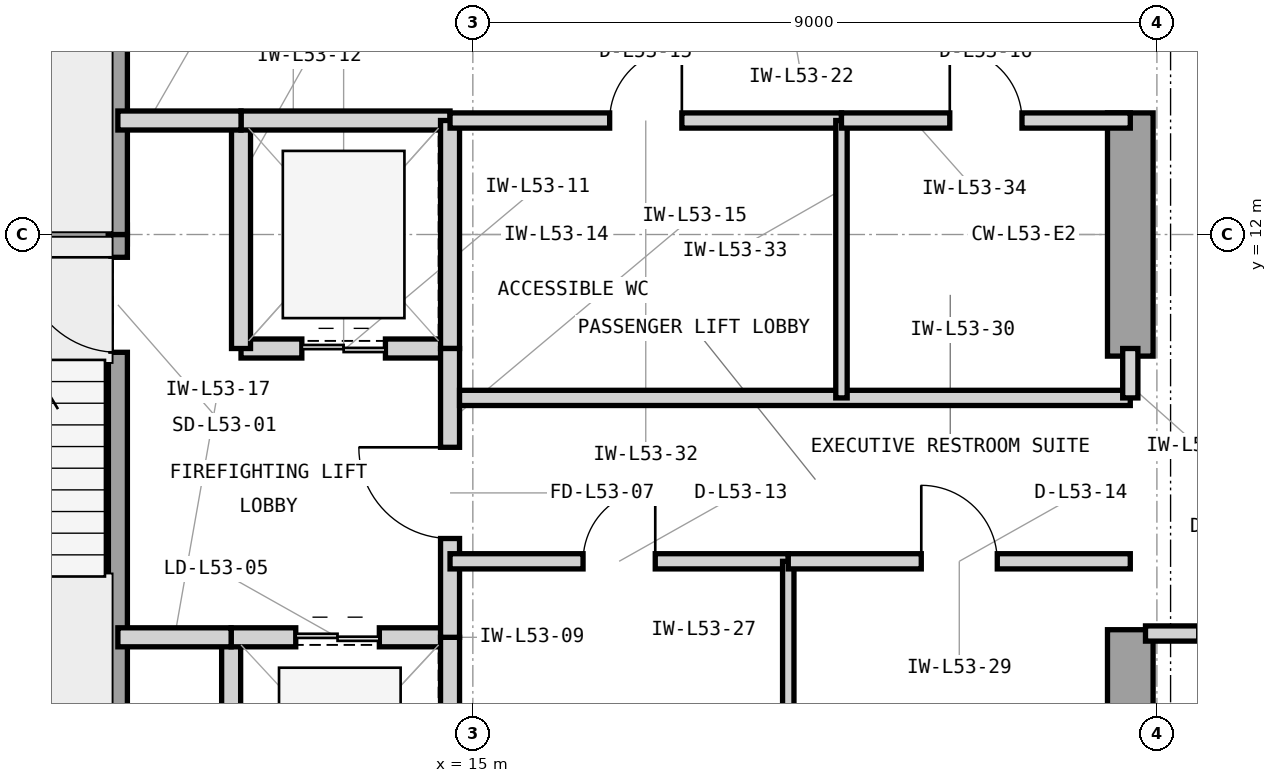
"""IFC4 building model, lengths in metres.
Left out: names, types, materials, properties, quantities, classifications, styles, units other than length and angle.
Written with IfcOpenShell. Run it as: python <this file> out.ifc"""

import sys

from ifc_helpers import new_model, si_unit, direction, frame, frame_2d, origin, place, context, subcontext, project, spatial, rectangle, extrude, element, fill, save


model = new_model("IFC4")
c1 = context("Model", 3, precision=1e-05, world=origin(), true_north=direction((0.0, 1.0)))
c2 = subcontext(c1, "Body", "Model", "MODEL_VIEW")
j1 = project(units=[si_unit("LENGTHUNIT", "METRE"), si_unit("PLANEANGLEUNIT", "RADIAN")], contexts=[c1])
p1 = place(None, origin())
s1 = spatial("IfcSite", under=j1, at=p1, CompositionType="ELEMENT")
p2 = place(p1, origin())
s2 = spatial("IfcBuilding", under=s1, at=p2, CompositionType="ELEMENT")
p3 = place(p2, frame((0.0, 0.0, 219.0)))
s3 = spatial("IfcBuildingStorey", under=s2, at=p3, CompositionType="ELEMENT", Elevation=219.0)
p4 = place(p3, frame((23.65, 3.65, 0.0), z_axis=(0.0, 0.0, 1.0), x_axis=(0.0, 1.0, 0.0)))
e1 = element("IfcWall", 1, at=p4, inside=s3, PredefinedType="SHEAR", context=c2, shape_type="SweptSolid", body=[
    extrude(rectangle(XDim=3.15, YDim=0.6, at=frame_2d((1.575, 0.0))), origin(), (0.0, 0.0, 1.0), 3.9),
])
p5 = place(p3, frame((23.65, 10.4, 0.0), z_axis=(0.0, 0.0, 1.0), x_axis=(0.0, 1.0, 0.0)))
e2 = element("IfcWall", 2, at=p5, inside=s3, PredefinedType="SHEAR", context=c2, shape_type="SweptSolid", body=[
    extrude(rectangle(XDim=3.2, YDim=0.6, at=frame_2d((1.6, 0.0))), origin(), (0.0, 0.0, 1.0), 3.9),
])
p6 = place(p3, frame((6.35, 12.0, 0.0), z_axis=(0.0, 0.0, 1.0), x_axis=(1.0, 0.0, 0.0)))
e3 = element("IfcWall", 3, at=p6, inside=s3, PredefinedType="SHEAR", context=c2, shape_type="SweptSolid", body=[
    extrude(rectangle(XDim=4.105, YDim=0.25, at=frame_2d((2.052, 0.0))), origin(), (0.0, 0.0, 1.0), 3.9),
])
p7 = place(p3, frame((10.33, 4.55, 0.0), z_axis=(0.0, 0.0, 1.0), x_axis=(0.0, 1.0, 0.0)))
e4 = element("IfcWall", 4, at=p7, inside=s3, PredefinedType="SHEAR", context=c2, shape_type="SweptSolid", body=[
    extrude(rectangle(XDim=7.45, YDim=0.25, at=frame_2d((3.725, 0.0))), origin(), (0.0, 0.0, 1.0), 3.9),
])
p8 = place(p7, frame((5.9, 0.0, 0.0)))
e5 = element("IfcOpeningElement", 5, at=p8, cuts=e4, PredefinedType="OPENING", context=c2, shape_type="SweptSolid", body=[
    extrude(rectangle(XDim=1.25, YDim=2.2, at=frame_2d((0.625, 1.1))), frame((0.0, 0.135, 0.0), z_axis=(0.0, -1.0, 0.0), x_axis=(1.0, 0.0, 0.0)), (0.0, 0.0, 1.0), 0.27),
])
p9 = place(p3, frame((10.33, 12.0, 0.0), z_axis=(0.0, 0.0, 1.0), x_axis=(0.0, 1.0, 0.0)))
e6 = element("IfcWall", 6, at=p9, inside=s3, PredefinedType="SHEAR", context=c2, shape_type="SweptSolid", body=[
    extrude(rectangle(XDim=7.45, YDim=0.25, at=frame_2d((3.725, 0.0))), origin(), (0.0, 0.0, 1.0), 3.9),
])
p10 = place(p9, frame((5.85, 0.0, 0.0)))
e7 = element("IfcOpeningElement", 7, at=p10, cuts=e6, PredefinedType="OPENING", context=c2, shape_type="SweptSolid", body=[
    extrude(rectangle(XDim=1.25, YDim=2.2, at=frame_2d((0.625, 1.1))), frame((0.0, 0.135, 0.0), z_axis=(0.0, -1.0, 0.0), x_axis=(1.0, 0.0, 0.0)), (0.0, 0.0, 1.0), 0.27),
])
p11 = place(p3, frame((11.82, 3.35, 0.0), z_axis=(0.0, 0.0, 1.0), x_axis=(0.0, 1.0, 0.0)))
e8 = element("IfcWall", 8, at=p11, inside=s3, PredefinedType="PARTITIONING", context=c2, shape_type="SweptSolid", body=[
    extrude(rectangle(XDim=3.35, YDim=0.25, at=frame_2d((1.675, 0.0))), origin(), (0.0, 0.0, 1.0), 3.64),
])
p12 = place(p3, frame((11.82, 6.7, 0.0), z_axis=(0.0, 0.0, 1.0), x_axis=(1.0, 0.0, 0.0)))
e9 = element("IfcWall", 9, at=p12, inside=s3, PredefinedType="PARTITIONING", context=c2, shape_type="SweptSolid", body=[
    extrude(rectangle(XDim=2.88, YDim=0.25, at=frame_2d((1.44, 0.0))), origin(), (0.0, 0.0, 1.0), 3.283),
])
p13 = place(p12, frame((0.85, 0.0, 0.0)))
e10 = element("IfcOpeningElement", 10, at=p13, cuts=e9, PredefinedType="OPENING", context=c2, shape_type="SweptSolid", body=[
    extrude(rectangle(XDim=1.1, YDim=2.25, at=frame_2d((0.55, 1.125))), frame((0.0, 0.135, 0.0), z_axis=(0.0, -1.0, 0.0), x_axis=(1.0, 0.0, 0.0)), (0.0, 0.0, 1.0), 0.27),
])
p14 = place(p3, frame((14.7, 3.35, 0.0), z_axis=(0.0, 0.0, 1.0), x_axis=(0.0, 1.0, 0.0)))
e11 = element("IfcWall", 11, at=p14, inside=s3, PredefinedType="PARTITIONING", context=c2, shape_type="SweptSolid", body=[
    extrude(rectangle(XDim=3.35, YDim=0.25, at=frame_2d((1.675, 0.0))), origin(), (0.0, 0.0, 1.0), 3.64),
])
p15 = place(p3, frame((11.95, 10.5, 0.0), z_axis=(0.0, 0.0, 1.0), x_axis=(1.0, 0.0, 0.0)))
e12 = element("IfcWall", 12, at=p15, inside=s3, PredefinedType="PARTITIONING", context=c2, shape_type="SweptSolid", body=[
    extrude(rectangle(XDim=2.75, YDim=0.25, at=frame_2d((1.375, 0.0))), origin(), (0.0, 0.0, 1.0), 3.283),
])
p16 = place(p15, frame((0.8, 0.0, 0.0)))
e13 = element("IfcOpeningElement", 13, at=p16, cuts=e12, PredefinedType="OPENING", context=c2, shape_type="SweptSolid", body=[
    extrude(rectangle(XDim=1.1, YDim=2.25, at=frame_2d((0.55, 1.125))), frame((0.0, 0.135, 0.0), z_axis=(0.0, -1.0, 0.0), x_axis=(1.0, 0.0, 0.0)), (0.0, 0.0, 1.0), 0.27),
])
p17 = place(p3, frame((11.95, 10.5, 0.0), z_axis=(0.0, 0.0, 1.0), x_axis=(0.0, 1.0, 0.0)))
e14 = element("IfcWall", 14, at=p17, inside=s3, PredefinedType="PARTITIONING", context=c2, shape_type="SweptSolid", body=[
    extrude(rectangle(XDim=3.0, YDim=0.25, at=frame_2d((1.5, 0.0))), origin(), (0.0, 0.0, 1.0), 3.64),
])
p18 = place(p3, frame((11.95, 13.5, 0.0), z_axis=(0.0, 0.0, 1.0), x_axis=(1.0, 0.0, 0.0)))
e15 = element("IfcWall", 15, at=p18, inside=s3, PredefinedType="PARTITIONING", context=c2, shape_type="SweptSolid", body=[
    extrude(rectangle(XDim=2.75, YDim=0.25, at=frame_2d((1.375, 0.0))), origin(), (0.0, 0.0, 1.0), 3.283),
])
p19 = place(p3, frame((14.7, 10.5, 0.0), z_axis=(0.0, 0.0, 1.0), x_axis=(0.0, 1.0, 0.0)))
e16 = element("IfcWall", 16, at=p19, inside=s3, PredefinedType="PARTITIONING", context=c2, shape_type="SweptSolid", body=[
    extrude(rectangle(XDim=3.0, YDim=0.25, at=frame_2d((1.5, 0.0))), origin(), (0.0, 0.0, 1.0), 3.64),
])
p20 = place(p3, frame((14.7, 6.7, 0.0), z_axis=(0.0, 0.0, 1.0), x_axis=(0.0, 1.0, 0.0)))
e17 = element("IfcWall", 17, at=p20, inside=s3, PredefinedType="PARTITIONING", context=c2, shape_type="SweptSolid", body=[
    extrude(rectangle(XDim=3.8, YDim=0.25, at=frame_2d((1.9, 0.0))), origin(), (0.0, 0.0, 1.0), 3.64),
])
p21 = place(p20, frame((1.3, 0.0, 0.0)))
e18 = element("IfcOpeningElement", 18, at=p21, cuts=e17, PredefinedType="OPENING", context=c2, shape_type="SweptSolid", body=[
    extrude(rectangle(XDim=1.2, YDim=2.2, at=frame_2d((0.6, 1.1))), frame((0.0, 0.135, 0.0), z_axis=(0.0, -1.0, 0.0), x_axis=(1.0, 0.0, 0.0)), (0.0, 0.0, 1.0), 0.27),
])
p22 = place(p3, frame((10.33, 13.5, 0.0), z_axis=(0.0, 0.0, 1.0), x_axis=(1.0, 0.0, 0.0)))
e19 = element("IfcWall", 19, at=p22, inside=s3, PredefinedType="PARTITIONING", context=c2, shape_type="SweptSolid", body=[
    extrude(rectangle(XDim=1.62, YDim=0.25, at=frame_2d((0.81, 0.0))), origin(), (0.0, 0.0, 1.0), 3.283),
])
p23 = place(p3, frame((10.33, 6.7, 0.0), z_axis=(0.0, 0.0, 1.0), x_axis=(1.0, 0.0, 0.0)))
e20 = element("IfcWall", 20, at=p23, inside=s3, PredefinedType="PARTITIONING", context=c2, shape_type="SweptSolid", body=[
    extrude(rectangle(XDim=1.49, YDim=0.25, at=frame_2d((0.745, 0.0))), origin(), (0.0, 0.0, 1.0), 3.283),
])
p24 = place(p3, frame((14.7, 7.7, 0.0), z_axis=(0.0, 0.0, 1.0), x_axis=(1.0, 0.0, 0.0)))
e21 = element("IfcWall", 21, at=p24, inside=s3, PredefinedType="PARTITIONING", context=c2, shape_type="SweptSolid", body=[
    extrude(rectangle(XDim=4.45, YDim=0.2, at=frame_2d((2.225, 0.0))), origin(), (0.0, 0.0, 1.0), 3.64),
])
p25 = place(p24, frame((1.75, 0.0, 0.0)))
e22 = element("IfcOpeningElement", 22, at=p25, cuts=e21, PredefinedType="OPENING", context=c2, shape_type="SweptSolid", body=[
    extrude(rectangle(XDim=0.95, YDim=2.1, at=frame_2d((0.475, 1.05))), frame((0.0, 0.11, 0.0), z_axis=(0.0, -1.0, 0.0), x_axis=(1.0, 0.0, 0.0)), (0.0, 0.0, 1.0), 0.22),
])
p26 = place(p3, frame((19.15, 3.35, 0.0), z_axis=(0.0, 0.0, 1.0), x_axis=(0.0, 1.0, 0.0)))
e23 = element("IfcWall", 23, at=p26, inside=s3, PredefinedType="PARTITIONING", context=c2, shape_type="SweptSolid", body=[
    extrude(rectangle(XDim=4.35, YDim=0.15, at=frame_2d((2.175, 0.0))), origin(), (0.0, 0.0, 1.0), 3.64),
])
p27 = place(p3, frame((19.15, 7.7, 0.0), z_axis=(0.0, 0.0, 1.0), x_axis=(1.0, 0.0, 0.0)))
e24 = element("IfcWall", 24, at=p27, inside=s3, PredefinedType="PARTITIONING", context=c2, shape_type="SweptSolid", body=[
    extrude(rectangle(XDim=4.5, YDim=0.2, at=frame_2d((2.25, 0.0))), origin(), (0.0, 0.0, 1.0), 3.64),
])
p28 = place(p27, frame((1.75, 0.0, 0.0)))
e25 = element("IfcOpeningElement", 25, at=p28, cuts=e24, PredefinedType="OPENING", context=c2, shape_type="SweptSolid", body=[
    extrude(rectangle(XDim=1.0, YDim=2.15, at=frame_2d((0.5, 1.075))), frame((0.0, 0.11, 0.0), z_axis=(0.0, -1.0, 0.0), x_axis=(1.0, 0.0, 0.0)), (0.0, 0.0, 1.0), 0.22),
])
p29 = place(p3, frame((14.825, 9.85, 0.0), z_axis=(0.0, 0.0, 1.0), x_axis=(1.0, 0.0, 0.0)))
e26 = element("IfcWall", 26, at=p29, inside=s3, PredefinedType="PARTITIONING", context=c2, shape_type="SweptSolid", body=[
    extrude(rectangle(XDim=8.825, YDim=0.2, at=frame_2d((4.413, 0.0))), origin(), (0.0, 0.0, 1.0), 3.64),
])
p30 = place(p3, frame((23.65, 9.85, 0.0), z_axis=(0.0, 0.0, 1.0), x_axis=(0.0, 1.0, 0.0)))
e27 = element("IfcWall", 27, at=p30, inside=s3, PredefinedType="PARTITIONING", context=c2, shape_type="SweptSolid", body=[
    extrude(rectangle(XDim=0.65, YDim=0.2, at=frame_2d((0.325, 0.0))), origin(), (0.0, 0.0, 1.0), 3.64),
])
p31 = place(p3, frame((14.7, 13.5, 0.0), z_axis=(0.0, 0.0, 1.0), x_axis=(1.0, 0.0, 0.0)))
e28 = element("IfcWall", 28, at=p31, inside=s3, PredefinedType="PARTITIONING", context=c2, shape_type="SweptSolid", body=[
    extrude(rectangle(XDim=5.15, YDim=0.2, at=frame_2d((2.575, 0.0))), origin(), (0.0, 0.0, 1.0), 3.283),
])
p32 = place(p31, frame((2.1, 0.0, 0.0)))
e29 = element("IfcOpeningElement", 29, at=p32, cuts=e28, PredefinedType="OPENING", context=c2, shape_type="SweptSolid", body=[
    extrude(rectangle(XDim=0.95, YDim=2.1, at=frame_2d((0.475, 1.05))), frame((0.0, 0.11, 0.0), z_axis=(0.0, -1.0, 0.0), x_axis=(1.0, 0.0, 0.0)), (0.0, 0.0, 1.0), 0.22),
])
p33 = place(p3, frame((19.85, 9.85, 0.0), z_axis=(0.0, 0.0, 1.0), x_axis=(0.0, 1.0, 0.0)))
e30 = element("IfcWall", 30, at=p33, inside=s3, PredefinedType="PARTITIONING", context=c2, shape_type="SweptSolid", body=[
    extrude(rectangle(XDim=3.65, YDim=0.15, at=frame_2d((1.825, 0.0))), origin(), (0.0, 0.0, 1.0), 3.64),
])
p34 = place(p3, frame((19.85, 13.5, 0.0), z_axis=(0.0, 0.0, 1.0), x_axis=(1.0, 0.0, 0.0)))
e31 = element("IfcWall", 31, at=p34, inside=s3, PredefinedType="PARTITIONING", context=c2, shape_type="SweptSolid", body=[
    extrude(rectangle(XDim=3.8, YDim=0.2, at=frame_2d((1.9, 0.0))), origin(), (0.0, 0.0, 1.0), 3.283),
])
p35 = place(p34, frame((1.425, 0.0, 0.0)))
e32 = element("IfcOpeningElement", 32, at=p35, cuts=e31, PredefinedType="OPENING", context=c2, shape_type="SweptSolid", body=[
    extrude(rectangle(XDim=0.95, YDim=2.1, at=frame_2d((0.475, 1.05))), frame((0.0, 0.11, 0.0), z_axis=(0.0, -1.0, 0.0), x_axis=(1.0, 0.0, 0.0)), (0.0, 0.0, 1.0), 0.22),
])
p36 = place(p3, frame((23.85, 6.75, 0.0), z_axis=(0.0, 0.0, 1.0), x_axis=(1.0, 0.0, 0.0)))
e33 = element("IfcWall", 33, at=p36, inside=s3, PredefinedType="PARTITIONING", context=c2, shape_type="SweptSolid", body=[
    extrude(rectangle(XDim=2.85, YDim=0.2, at=frame_2d((1.425, 0.0))), origin(), (0.0, 0.0, 1.0), 3.64),
])
p37 = place(p36, frame((0.7, 0.0, 0.0)))
e34 = element("IfcOpeningElement", 34, at=p37, cuts=e33, PredefinedType="OPENING", context=c2, shape_type="SweptSolid", body=[
    extrude(rectangle(XDim=1.0, YDim=2.15, at=frame_2d((0.5, 1.075))), frame((0.0, 0.11, 0.0), z_axis=(0.0, -1.0, 0.0), x_axis=(1.0, 0.0, 0.0)), (0.0, 0.0, 1.0), 0.22),
])
p38 = place(p8, origin())
e35 = element("IfcDoor", 35, at=p38, inside=s3, OperationType="SINGLE_SWING_RIGHT", PredefinedType="DOOR", context=c2, shape_type="SweptSolid", body=[
    extrude(rectangle(XDim=1.25, YDim=2.2, at=frame_2d((0.625, 1.1))), frame((0.0, 0.025, 0.0), z_axis=(0.0, -1.0, 0.0), x_axis=(1.0, 0.0, 0.0)), (0.0, 0.0, 1.0), 0.05),
])
fill(e5, e35)
p39 = place(p13, origin())
e36 = element("IfcDoor", 36, at=p39, inside=s3, OperationType="DOUBLE_DOOR_SLIDING", PredefinedType="DOOR", context=c2, shape_type="SweptSolid", body=[
    extrude(rectangle(XDim=1.1, YDim=2.25, at=frame_2d((0.55, 1.125))), frame((0.0, 0.025, 0.0), z_axis=(0.0, -1.0, 0.0), x_axis=(1.0, 0.0, 0.0)), (0.0, 0.0, 1.0), 0.05),
])
fill(e10, e36)
p40 = place(p16, origin())
e37 = element("IfcDoor", 37, at=p40, inside=s3, OperationType="DOUBLE_DOOR_SLIDING", PredefinedType="DOOR", context=c2, shape_type="SweptSolid", body=[
    extrude(rectangle(XDim=1.1, YDim=2.25, at=frame_2d((0.55, 1.125))), frame((0.0, 0.025, 0.0), z_axis=(0.0, -1.0, 0.0), x_axis=(1.0, 0.0, 0.0)), (0.0, 0.0, 1.0), 0.05),
])
fill(e13, e37)
p41 = place(p21, origin())
e38 = element("IfcDoor", 38, at=p41, inside=s3, OperationType="SINGLE_SWING_RIGHT", PredefinedType="DOOR", context=c2, shape_type="SweptSolid", body=[
    extrude(rectangle(XDim=1.2, YDim=2.2, at=frame_2d((0.6, 1.1))), frame((0.0, 0.025, 0.0), z_axis=(0.0, -1.0, 0.0), x_axis=(1.0, 0.0, 0.0)), (0.0, 0.0, 1.0), 0.05),
])
fill(e18, e38)
p42 = place(p25, origin())
e39 = element("IfcDoor", 39, at=p42, inside=s3, OperationType="SINGLE_SWING_RIGHT", PredefinedType="DOOR", context=c2, shape_type="SweptSolid", body=[
    extrude(rectangle(XDim=0.95, YDim=2.1, at=frame_2d((0.475, 1.05))), frame((0.0, 0.025, 0.0), z_axis=(0.0, -1.0, 0.0), x_axis=(1.0, 0.0, 0.0)), (0.0, 0.0, 1.0), 0.05),
])
fill(e22, e39)
p43 = place(p28, origin())
e40 = element("IfcDoor", 40, at=p43, inside=s3, OperationType="SINGLE_SWING_LEFT", PredefinedType="DOOR", context=c2, shape_type="SweptSolid", body=[
    extrude(rectangle(XDim=1.0, YDim=2.15, at=frame_2d((0.5, 1.075))), frame((0.0, 0.025, 0.0), z_axis=(0.0, -1.0, 0.0), x_axis=(1.0, 0.0, 0.0)), (0.0, 0.0, 1.0), 0.05),
])
fill(e25, e40)
p44 = place(p32, origin())
e41 = element("IfcDoor", 41, at=p44, inside=s3, OperationType="SINGLE_SWING_RIGHT", PredefinedType="DOOR", context=c2, shape_type="SweptSolid", body=[
    extrude(rectangle(XDim=0.95, YDim=2.1, at=frame_2d((0.475, 1.05))), frame((0.0, 0.025, 0.0), z_axis=(0.0, -1.0, 0.0), x_axis=(1.0, 0.0, 0.0)), (0.0, 0.0, 1.0), 0.05),
])
fill(e29, e41)
p45 = place(p35, origin())
e42 = element("IfcDoor", 42, at=p45, inside=s3, OperationType="SINGLE_SWING_LEFT", PredefinedType="DOOR", context=c2, shape_type="SweptSolid", body=[
    extrude(rectangle(XDim=0.95, YDim=2.1, at=frame_2d((0.475, 1.05))), frame((0.0, 0.025, 0.0), z_axis=(0.0, -1.0, 0.0), x_axis=(1.0, 0.0, 0.0)), (0.0, 0.0, 1.0), 0.05),
])
fill(e32, e42)
save(model, sys.argv[1])
